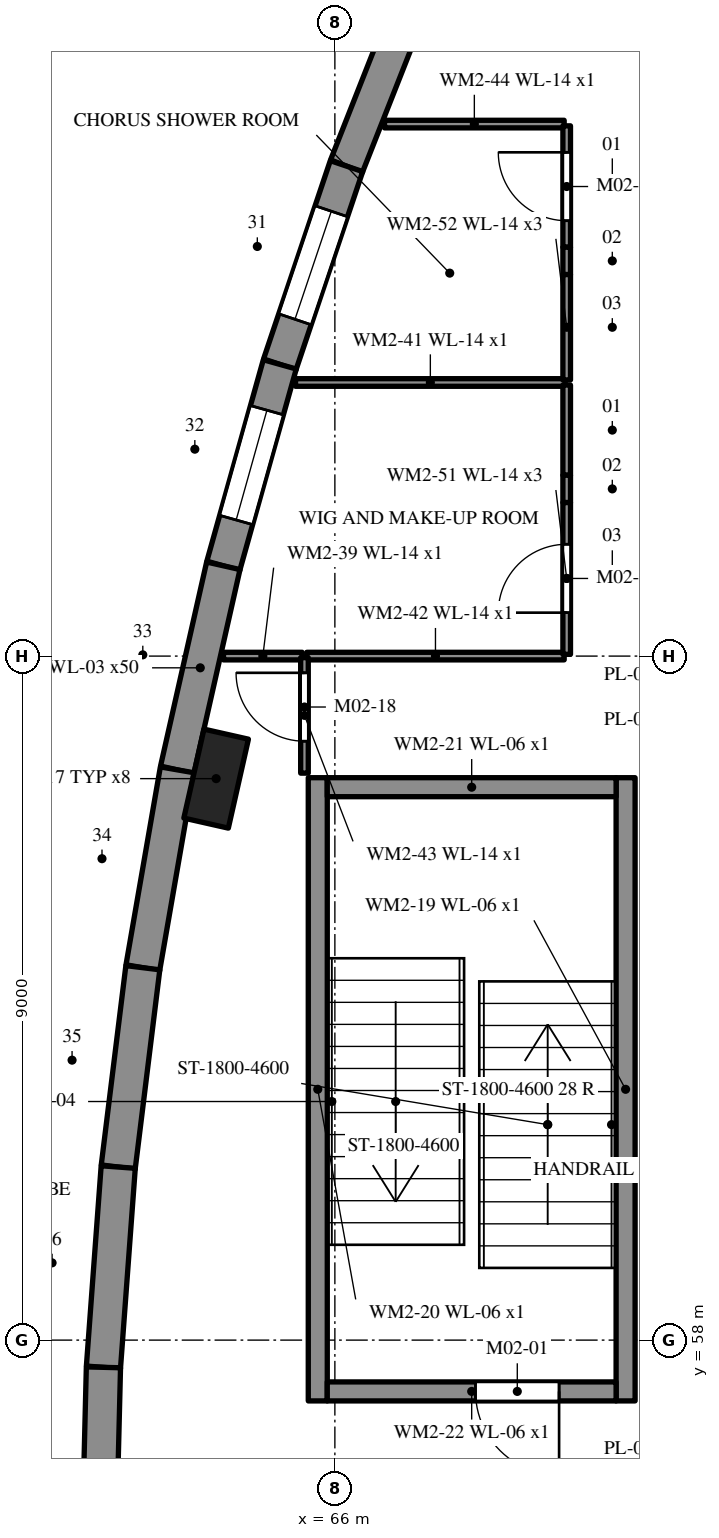
"""IFC4 building model, lengths in metres.
Left out: names, types, materials, properties, quantities, classifications, styles, units other than length and angle.
Written with IfcOpenShell. Run it as: python <this file> out.ifc"""

import sys

from ifc_helpers import new_model, si_unit, direction, frame, frame_2d, origin, origin_2d, place, context, subcontext, project, spatial, polyline, rectangle, outline, extrude, element, fill, save


model = new_model("IFC4")
c1 = context("Model", 3, precision=1e-05, world=origin(), true_north=direction((0.0, 1.0)))
c2 = subcontext(c1, "Body", "Model", "MODEL_VIEW")
j1 = project(units=[si_unit("LENGTHUNIT", "METRE"), si_unit("PLANEANGLEUNIT", "RADIAN")], contexts=[c1])
p1 = place(None, origin())
s1 = spatial("IfcSite", under=j1, at=p1, CompositionType="ELEMENT")
p2 = place(p1, origin())
s2 = spatial("IfcBuilding", under=s1, at=p2, CompositionType="ELEMENT")
p3 = place(p2, frame((0.0, 0.0, 10.2)))
s3 = spatial("IfcBuildingStorey", under=s2, at=p3, CompositionType="ELEMENT", Elevation=10.2)
p4 = place(p3, frame((67.163, 76.007, 0.0), z_axis=(0.0, 0.0, 1.0), x_axis=(-0.366920100653, -0.930252460215, 0.0)))
e1 = element("IfcWall", 1, at=p4, inside=s3, PredefinedType="SOLIDWALL", context=c2, shape_type="SweptSolid", body=[
    extrude(rectangle(XDim=2.752, YDim=0.45, at=frame_2d((1.376, 0.0))), origin(), (0.0, 0.0, 1.0), 4.6),
])
p5 = place(p3, frame((66.153, 73.447, 0.0), z_axis=(0.0, 0.0, 1.0), x_axis=(-0.318887614688, -0.947792534893, 0.0)))
e2 = element("IfcWall", 2, at=p5, inside=s3, PredefinedType="SOLIDWALL", context=c2, shape_type="SweptSolid", body=[
    extrude(rectangle(XDim=2.752, YDim=0.45, at=frame_2d((1.376, 0.0))), origin(), (0.0, 0.0, 1.0), 4.6),
])
p6 = place(p5, frame((0.626, 0.0, 0.9)))
e3 = element("IfcOpeningElement", 3, at=p6, cuts=e2, PredefinedType="OPENING", context=c2, shape_type="SweptSolid", body=[
    extrude(rectangle(XDim=1.5, YDim=2.1, at=frame_2d((0.75, 1.05))), frame((0.0, 0.235, 0.0), z_axis=(0.0, -1.0, 0.0), x_axis=(1.0, 0.0, 0.0)), (0.0, 0.0, 1.0), 0.47),
])
p7 = place(p3, frame((65.275, 70.838, 0.0), z_axis=(0.0, 0.0, 1.0), x_axis=(-0.270008269196, -0.962858003324, 0.0)))
e4 = element("IfcWall", 4, at=p7, inside=s3, PredefinedType="SOLIDWALL", context=c2, shape_type="SweptSolid", body=[
    extrude(rectangle(XDim=2.752, YDim=0.45, at=frame_2d((1.376, 0.0))), origin(), (0.0, 0.0, 1.0), 4.6),
])
p8 = place(p7, frame((0.626, 0.0, 0.9)))
e5 = element("IfcOpeningElement", 5, at=p8, cuts=e4, PredefinedType="OPENING", context=c2, shape_type="SweptSolid", body=[
    extrude(rectangle(XDim=1.5, YDim=2.1, at=frame_2d((0.75, 1.05))), frame((0.0, 0.235, 0.0), z_axis=(0.0, -1.0, 0.0), x_axis=(1.0, 0.0, 0.0)), (0.0, 0.0, 1.0), 0.47),
])
p9 = place(p3, frame((64.532, 68.188, 0.0), z_axis=(0.0, 0.0, 1.0), x_axis=(-0.220347996563, -0.975421324562, 0.0)))
e6 = element("IfcWall", 6, at=p9, inside=s3, PredefinedType="SOLIDWALL", context=c2, shape_type="SweptSolid", body=[
    extrude(rectangle(XDim=2.752, YDim=0.45, at=frame_2d((1.376, 0.0))), origin(), (0.0, 0.0, 1.0), 4.6),
])
p10 = place(p3, frame((63.926, 65.503, 0.0), z_axis=(0.0, 0.0, 1.0), x_axis=(-0.171196910379, -0.985236833394, 0.0)))
e7 = element("IfcWall", 7, at=p10, inside=s3, PredefinedType="SOLIDWALL", context=c2, shape_type="SweptSolid", body=[
    extrude(rectangle(XDim=2.643, YDim=0.45, at=frame_2d((1.321, 0.0))), origin(), (0.0, 0.0, 1.0), 4.6),
])
p11 = place(p3, frame((63.473, 62.9, 0.0), z_axis=(0.0, 0.0, 1.0), x_axis=(-0.122499610212, -0.992468561466, 0.0)))
e8 = element("IfcWall", 8, at=p11, inside=s3, PredefinedType="SOLIDWALL", context=c2, shape_type="SweptSolid", body=[
    extrude(rectangle(XDim=2.643, YDim=0.45, at=frame_2d((1.321, 0.0))), origin(), (0.0, 0.0, 1.0), 4.6),
])
p12 = place(p3, frame((63.15, 60.277, 0.0), z_axis=(0.0, 0.0, 1.0), x_axis=(-0.07363685767, -0.997285121313, 0.0)))
e9 = element("IfcWall", 9, at=p12, inside=s3, PredefinedType="SOLIDWALL", context=c2, shape_type="SweptSolid", body=[
    extrude(rectangle(XDim=2.642, YDim=0.45, at=frame_2d((1.321, 0.0))), origin(), (0.0, 0.0, 1.0), 4.6),
])
p13 = place(p3, frame((62.955, 57.642, 0.0), z_axis=(0.0, 0.0, 1.0), x_axis=(-0.024666736886, -0.999695729756, 0.0)))
e10 = element("IfcWall", 10, at=p13, inside=s3, PredefinedType="SOLIDWALL", context=c2, shape_type="SweptSolid", body=[
    extrude(rectangle(XDim=2.643, YDim=0.45, at=frame_2d((1.321, 0.0))), origin(), (0.0, 0.0, 1.0), 4.6),
])
p14 = place(p3, frame((64.438, 65.388, 0.0), z_axis=(0.0, 0.0, 1.0), x_axis=(-0.220356962886, -0.975419299024, 0.0)))
e11 = element("IfcColumn", 11, at=p14, inside=s3, PredefinedType="PILASTER", context=c2, shape_type="SweptSolid", body=[
    extrude(rectangle(XDim=1.2, YDim=0.6, at=origin_2d()), origin(), (0.0, 0.0, 1.0), 4.6),
])
for number, where, z_axis, x_axis in (
    (12, (69.825, 57.2, 0.0), (0.0, 0.0, 1.0), (0.0, 1.0, 0.0)),
    (13, (65.775, 65.4, 0.0), (0.0, 0.0, 1.0), (0.0, -1.0, 0.0)),
):
    element("IfcWall", number, at=place(p3, frame(where, z_axis=z_axis, x_axis=x_axis)), inside=s3, PredefinedType="SHEAR", context=c2, shape_type="SweptSolid", body=[
        extrude(rectangle(XDim=8.2, YDim=0.25, at=frame_2d((4.1, 0.0))), origin(), (0.0, 0.0, 1.0), 4.6),
    ])
p15 = place(p3, frame((65.9, 65.275, 0.0), z_axis=(0.0, 0.0, 1.0), x_axis=(1.0, 0.0, 0.0)))
e14 = element("IfcWall", 14, at=p15, inside=s3, PredefinedType="SHEAR", context=c2, shape_type="SweptSolid", body=[
    extrude(rectangle(XDim=3.8, YDim=0.25, at=frame_2d((1.9, 0.0))), origin(), (0.0, 0.0, 1.0), 4.6),
])
p16 = place(p3, frame((69.7, 57.325, 0.0), z_axis=(0.0, 0.0, 1.0), x_axis=(-1.0, 0.0, 0.0)))
e15 = element("IfcWall", 15, at=p16, inside=s3, PredefinedType="SHEAR", context=c2, shape_type="SweptSolid", body=[
    extrude(rectangle(XDim=3.8, YDim=0.25, at=frame_2d((1.9, 0.0))), origin(), (0.0, 0.0, 1.0), 4.6),
])
p17 = place(p16, frame((0.75, 0.0, 0.0)))
e16 = element("IfcOpeningElement", 16, at=p17, cuts=e15, PredefinedType="OPENING", context=c2, shape_type="SweptSolid", body=[
    extrude(rectangle(XDim=1.1, YDim=2.1, at=frame_2d((0.55, 1.05))), frame((0.0, 0.135, 0.0), z_axis=(0.0, -1.0, 0.0), x_axis=(1.0, 0.0, 0.0)), (0.0, 0.0, 1.0), 0.27),
])
p18 = place(p3, frame((65.57, 67.0, 0.0), z_axis=(0.0, 0.0, 1.0), x_axis=(-1.0, 0.0, 0.0)))
e17 = element("IfcWall", 17, at=p18, inside=s3, PredefinedType="PARTITIONING", context=c2, shape_type="SweptSolid", body=[
    extrude(rectangle(XDim=1.035, YDim=0.1, at=frame_2d((0.518, 0.0))), origin(), (0.0, 0.0, 1.0), 4.35),
])
p19 = place(p3, frame((65.482, 70.6, 0.0), z_axis=(0.0, 0.0, 1.0), x_axis=(1.0, 0.0, 0.0)))
e18 = element("IfcWall", 18, at=p19, inside=s3, PredefinedType="PARTITIONING", context=c2, shape_type="SweptSolid", body=[
    extrude(rectangle(XDim=3.548, YDim=0.1, at=frame_2d((1.774, 0.0))), origin(), (0.0, 0.0, 1.0), 4.35),
])
p20 = place(p3, frame((69.017, 67.0, 0.0), z_axis=(0.0, 0.0, 1.0), x_axis=(-1.0, 0.0, 0.0)))
e19 = element("IfcWall", 19, at=p20, inside=s3, PredefinedType="PARTITIONING", context=c2, shape_type="SweptSolid", body=[
    extrude(rectangle(XDim=3.387, YDim=0.1, at=frame_2d((1.693, 0.0))), origin(), (0.0, 0.0, 1.0), 4.35),
])
p21 = place(p3, frame((65.6, 66.98, 0.0), z_axis=(0.0, 0.0, 1.0), x_axis=(0.0, -1.0, 0.0)))
e20 = element("IfcWall", 20, at=p21, inside=s3, PredefinedType="PARTITIONING", context=c2, shape_type="SweptSolid", body=[
    extrude(outline(polyline([(0.0, 0.0), (1.52, 0.0), (1.52, 4.35), (0.987, 4.35), (0.985, 3.62), (0.575, 3.62), (0.573, 4.35), (0.0, 4.35), (0.0, 0.0)])), frame((0.0, 0.05, 0.0), z_axis=(0.0, -1.0, 0.0), x_axis=(1.0, 0.0, 0.0)), (0.0, 0.0, 1.0), 0.1),
])
p22 = place(p21, frame((0.2, 0.0, 0.0)))
e21 = element("IfcOpeningElement", 21, at=p22, cuts=e20, PredefinedType="OPENING", context=c2, shape_type="SweptSolid", body=[
    extrude(rectangle(XDim=0.9, YDim=2.1, at=frame_2d((0.45, 1.05))), frame((0.0, 0.06, 0.0), z_axis=(0.0, -1.0, 0.0), x_axis=(1.0, 0.0, 0.0)), (0.0, 0.0, 1.0), 0.12),
])
p23 = place(p3, frame((66.653, 74.0, 0.0), z_axis=(0.0, 0.0, 1.0), x_axis=(1.0, 0.0, 0.0)))
e22 = element("IfcWall", 22, at=p23, inside=s3, PredefinedType="PARTITIONING", context=c2, shape_type="SweptSolid", body=[
    extrude(rectangle(XDim=2.364, YDim=0.1, at=frame_2d((1.182, 0.0))), origin(), (0.0, 0.0, 1.0), 4.35),
])
p24 = place(p3, frame((69.05, 70.567, 0.0), z_axis=(0.0, 0.0, 1.0), x_axis=(0.0, -1.0, 0.0)))
e23 = element("IfcWall", 23, at=p24, inside=s3, PredefinedType="PARTITIONING", context=c2, shape_type="SweptSolid", body=[
    extrude(rectangle(XDim=1.187, YDim=0.1, at=frame_2d((0.594, 0.0))), origin(), (0.0, 0.0, 1.0), 4.35),
])
p25 = place(p3, frame((69.05, 69.38, 0.0), z_axis=(0.0, 0.0, 1.0), x_axis=(0.0, -1.0, 0.0)))
e24 = element("IfcWall", 24, at=p25, inside=s3, PredefinedType="PARTITIONING", context=c2, shape_type="SweptSolid", body=[
    extrude(rectangle(XDim=0.36, YDim=0.1, at=frame_2d((0.18, 0.0))), origin(), (0.0, 0.0, 1.0), 3.72),
])
p26 = place(p3, frame((69.05, 69.02, 0.0), z_axis=(0.0, 0.0, 1.0), x_axis=(0.0, -1.0, 0.0)))
e25 = element("IfcWall", 25, at=p26, inside=s3, PredefinedType="PARTITIONING", context=c2, shape_type="SweptSolid", body=[
    extrude(rectangle(XDim=1.997, YDim=0.1, at=frame_2d((0.999, 0.0))), origin(), (0.0, 0.0, 1.0), 4.35),
])
p27 = place(p26, frame((0.548, 0.0, 0.0)))
e26 = element("IfcOpeningElement", 26, at=p27, cuts=e25, PredefinedType="OPENING", context=c2, shape_type="SweptSolid", body=[
    extrude(rectangle(XDim=0.9, YDim=2.1, at=frame_2d((0.45, 1.05))), frame((0.0, 0.06, 0.0), z_axis=(0.0, -1.0, 0.0), x_axis=(1.0, 0.0, 0.0)), (0.0, 0.0, 1.0), 0.12),
])
p28 = place(p3, frame((69.05, 73.977, 0.0), z_axis=(0.0, 0.0, 1.0), x_axis=(0.0, -1.0, 0.0)))
e27 = element("IfcWall", 27, at=p28, inside=s3, PredefinedType="PARTITIONING", context=c2, shape_type="SweptSolid", body=[
    extrude(rectangle(XDim=1.597, YDim=0.1, at=frame_2d((0.798, 0.0))), origin(), (0.0, 0.0, 1.0), 4.35),
])
p29 = place(p28, frame((0.348, 0.0, 0.0)))
e28 = element("IfcOpeningElement", 28, at=p29, cuts=e27, PredefinedType="OPENING", context=c2, shape_type="SweptSolid", body=[
    extrude(rectangle(XDim=0.9, YDim=2.1, at=frame_2d((0.45, 1.05))), frame((0.0, 0.06, 0.0), z_axis=(0.0, -1.0, 0.0), x_axis=(1.0, 0.0, 0.0)), (0.0, 0.0, 1.0), 0.12),
])
p30 = place(p3, frame((69.05, 72.38, 0.0), z_axis=(0.0, 0.0, 1.0), x_axis=(0.0, -1.0, 0.0)))
e29 = element("IfcWall", 29, at=p30, inside=s3, PredefinedType="PARTITIONING", context=c2, shape_type="SweptSolid", body=[
    extrude(rectangle(XDim=0.36, YDim=0.1, at=frame_2d((0.18, 0.0))), origin(), (0.0, 0.0, 1.0), 3.72),
])
p31 = place(p3, frame((69.05, 72.02, 0.0), z_axis=(0.0, 0.0, 1.0), x_axis=(0.0, -1.0, 0.0)))
e30 = element("IfcWall", 30, at=p31, inside=s3, PredefinedType="PARTITIONING", context=c2, shape_type="SweptSolid", body=[
    extrude(rectangle(XDim=1.387, YDim=0.1, at=frame_2d((0.693, 0.0))), origin(), (0.0, 0.0, 1.0), 4.35),
])
p32 = place(p17, origin())
e31 = element("IfcDoor", 31, at=p32, inside=s3, OperationType="SINGLE_SWING_LEFT", PredefinedType="DOOR", context=c2, shape_type="SweptSolid", body=[
    extrude(rectangle(XDim=1.1, YDim=2.1, at=frame_2d((0.55, 1.05))), frame((0.0, 0.025, 0.0), z_axis=(0.0, -1.0, 0.0), x_axis=(1.0, 0.0, 0.0)), (0.0, 0.0, 1.0), 0.05),
])
fill(e16, e31)
p33 = place(p6, origin())
e32 = element("IfcWindow", 32, at=p33, inside=s3, PartitioningType="SINGLE_PANEL", PredefinedType="WINDOW", context=c2, shape_type="SweptSolid", body=[
    extrude(rectangle(XDim=1.5, YDim=2.1, at=frame_2d((0.75, 1.05))), frame((0.0, 0.03, 0.0), z_axis=(0.0, -1.0, 0.0), x_axis=(1.0, 0.0, 0.0)), (0.0, 0.0, 1.0), 0.06),
])
fill(e3, e32)
p34 = place(p8, origin())
e33 = element("IfcWindow", 33, at=p34, inside=s3, PartitioningType="SINGLE_PANEL", PredefinedType="WINDOW", context=c2, shape_type="SweptSolid", body=[
    extrude(rectangle(XDim=1.5, YDim=2.1, at=frame_2d((0.75, 1.05))), frame((0.0, 0.03, 0.0), z_axis=(0.0, -1.0, 0.0), x_axis=(1.0, 0.0, 0.0)), (0.0, 0.0, 1.0), 0.06),
])
fill(e5, e33)
p35 = place(p27, frame((0.9, 0.0, 0.0), z_axis=(0.0, 0.0, 1.0), x_axis=(-1.0, 0.0, 0.0)))
e34 = element("IfcDoor", 34, at=p35, inside=s3, OperationType="SINGLE_SWING_LEFT", PredefinedType="DOOR", context=c2, shape_type="SweptSolid", body=[
    extrude(rectangle(XDim=0.9, YDim=2.1, at=frame_2d((0.45, 1.05))), frame((0.0, 0.025, 0.0), z_axis=(0.0, -1.0, 0.0), x_axis=(1.0, 0.0, 0.0)), (0.0, 0.0, 1.0), 0.05),
])
fill(e26, e34)
p36 = place(p29, frame((0.9, 0.0, 0.0), z_axis=(0.0, 0.0, 1.0), x_axis=(-1.0, 0.0, 0.0)))
e35 = element("IfcDoor", 35, at=p36, inside=s3, OperationType="SINGLE_SWING_RIGHT", PredefinedType="DOOR", context=c2, shape_type="SweptSolid", body=[
    extrude(rectangle(XDim=0.9, YDim=2.1, at=frame_2d((0.45, 1.05))), frame((0.0, 0.025, 0.0), z_axis=(0.0, -1.0, 0.0), x_axis=(1.0, 0.0, 0.0)), (0.0, 0.0, 1.0), 0.05),
])
fill(e28, e35)
p37 = place(p22, frame((0.9, 0.0, 0.0), z_axis=(0.0, 0.0, 1.0), x_axis=(-1.0, 0.0, 0.0)))
e36 = element("IfcDoor", 36, at=p37, inside=s3, OperationType="SINGLE_SWING_RIGHT", PredefinedType="DOOR", context=c2, shape_type="SweptSolid", body=[
    extrude(rectangle(XDim=0.9, YDim=2.1, at=frame_2d((0.45, 1.05))), frame((0.0, 0.025, 0.0), z_axis=(0.0, -1.0, 0.0), x_axis=(1.0, 0.0, 0.0)), (0.0, 0.0, 1.0), 0.05),
])
fill(e21, e36)
save(model, sys.argv[1])
